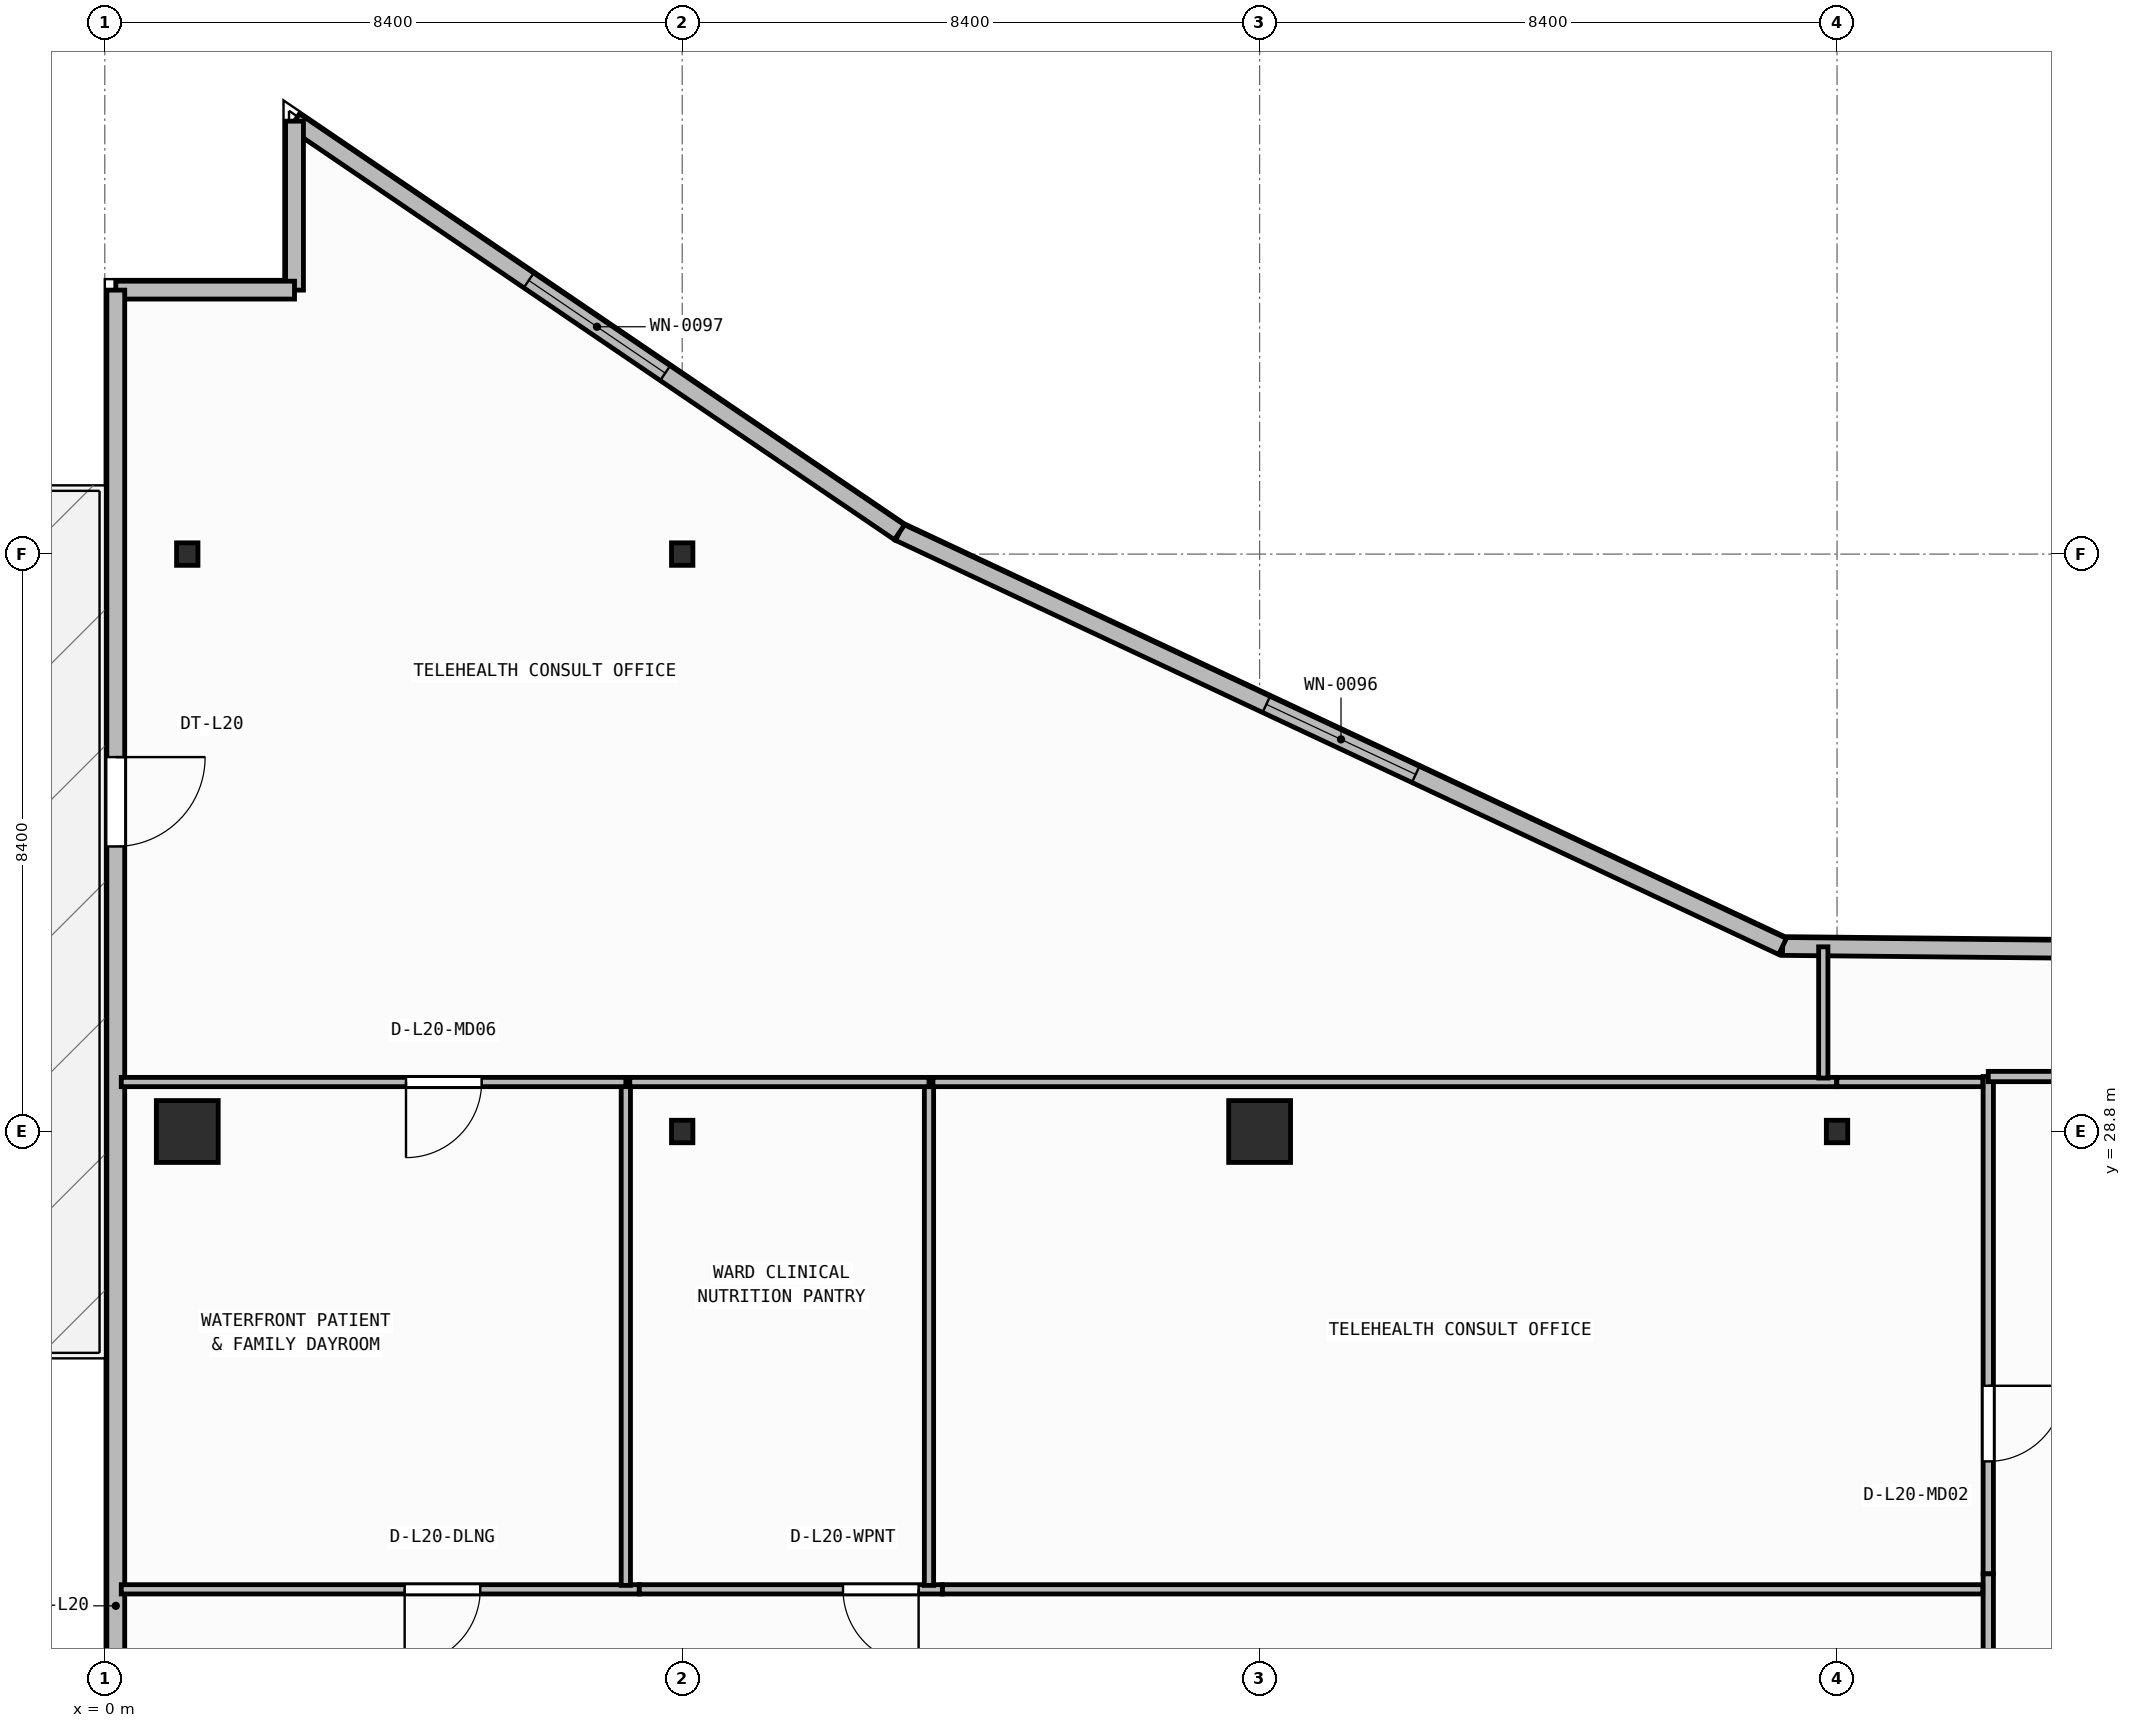
"""IFC4 building model, lengths in metres.
Left out: names, types, materials, properties, quantities, classifications, styles, units other than length and angle.
Written with IfcOpenShell. Run it as: python <this file> out.ifc"""

import sys

from ifc_helpers import new_model, si_unit, direction, frame, frame_2d, origin, origin_2d, place, context, subcontext, project, spatial, rectangle, i_section, extrude, element, fill, save


model = new_model("IFC4")
c1 = context("Model", 3, precision=1e-05, world=origin(), true_north=direction((0.0, 1.0)))
c2 = subcontext(c1, "Body", "Model", "MODEL_VIEW")
j1 = project(units=[si_unit("LENGTHUNIT", "METRE"), si_unit("PLANEANGLEUNIT", "RADIAN")], contexts=[c1])
p1 = place(None, origin())
s1 = spatial("IfcSite", under=j1, at=p1, CompositionType="ELEMENT")
p2 = place(p1, origin())
s2 = spatial("IfcBuilding", under=s1, at=p2, CompositionType="ELEMENT")
p3 = place(p2, frame((0.0, 0.0, 81.75)))
s3 = spatial("IfcBuildingStorey", under=s2, at=p3, CompositionType="ELEMENT", Elevation=81.75)
p4 = place(p3, frame((1.2, 28.8, 0.0), z_axis=(0.0, 0.0, 1.0), x_axis=(1.0, 0.0, 0.0)))
e1 = element("IfcColumn", 1, at=p4, inside=s3, PredefinedType="COLUMN", context=c2, shape_type="SweptSolid", body=[
    extrude(rectangle(XDim=0.9, YDim=0.9, at=origin_2d()), origin(), (0.0, 0.0, 1.0), 3.95),
])
p5 = place(p3, frame((8.4, 28.8, 0.0), z_axis=(0.0, 0.0, 1.0), x_axis=(1.0, 0.0, 0.0)))
e2 = element("IfcColumn", 2, at=p5, inside=s3, PredefinedType="COLUMN", context=c2, shape_type="SweptSolid", body=[
    extrude(i_section(OverallWidth=0.311, OverallDepth=0.327, WebThickness=0.016, FlangeThickness=0.025, FilletRadius=0.017, at=origin_2d()), origin(), (0.0, 0.0, 1.0), 3.95),
])
p6 = place(p3, frame((16.8, 28.8, 0.0), z_axis=(0.0, 0.0, 1.0), x_axis=(1.0, 0.0, 0.0)))
e3 = element("IfcColumn", 3, at=p6, inside=s3, PredefinedType="COLUMN", context=c2, shape_type="SweptSolid", body=[
    extrude(rectangle(XDim=0.9, YDim=0.9, at=origin_2d()), origin(), (0.0, 0.0, 1.0), 3.95),
])
for number, where, z_axis, x_axis in (
    (4, (25.2, 28.8, 0.0), (0.0, 0.0, 1.0), (1.0, 0.0, 0.0)),
    (5, (1.2, 37.2, 0.0), (0.0, 0.0, 1.0), (1.0, 0.0, 0.0)),
    (6, (8.4, 37.2, 0.0), (0.0, 0.0, 1.0), (1.0, 0.0, 0.0)),
):
    element("IfcColumn", number, at=place(p3, frame(where, z_axis=z_axis, x_axis=x_axis)), inside=s3, PredefinedType="COLUMN", context=c2, shape_type="SweptSolid", body=[
        extrude(i_section(OverallWidth=0.311, OverallDepth=0.327, WebThickness=0.016, FlangeThickness=0.025, FilletRadius=0.017, at=origin_2d()), origin(), (0.0, 0.0, 1.0), 3.95),
    ])
p7 = place(p3, frame((39.59, 31.344, 0.0), z_axis=(0.0, 0.0, 1.0), x_axis=(-0.999952362926, 0.009760731435, 0.0)))
e7 = element("IfcWall", 7, at=p7, inside=s3, PredefinedType="STANDARD", context=c2, shape_type="SweptSolid", body=[
    extrude(rectangle(XDim=15.183, YDim=0.26, at=frame_2d((7.591, 0.0))), origin(), (0.0, 0.0, 1.0), 3.71),
])
p8 = place(p7, frame((6.391, 0.0, 0.9)))
e8 = element("IfcOpeningElement", 8, at=p8, cuts=e7, PredefinedType="OPENING", context=c2, shape_type="SweptSolid", body=[
    extrude(rectangle(XDim=2.4, YDim=1.65, at=frame_2d((1.2, 0.825))), frame((0.0, 0.14, 0.0), z_axis=(0.0, -1.0, 0.0), x_axis=(1.0, 0.0, 0.0)), (0.0, 0.0, 1.0), 0.28),
])
p9 = place(p3, frame((24.408, 31.492, 0.0), z_axis=(0.0, 0.0, 1.0), x_axis=(-0.905396522918, 0.424566998585, 0.0)))
e9 = element("IfcWall", 9, at=p9, inside=s3, PredefinedType="STANDARD", context=c2, shape_type="SweptSolid", body=[
    extrude(rectangle(XDim=14.189, YDim=0.26, at=frame_2d((7.095, 0.0))), origin(), (0.0, 0.0, 1.0), 3.71),
])
p10 = place(p9, frame((5.895, 0.0, 0.9)))
e10 = element("IfcOpeningElement", 10, at=p10, cuts=e9, PredefinedType="OPENING", context=c2, shape_type="SweptSolid", body=[
    extrude(rectangle(XDim=2.4, YDim=1.65, at=frame_2d((1.2, 0.825))), frame((0.0, 0.14, 0.0), z_axis=(0.0, -1.0, 0.0), x_axis=(1.0, 0.0, 0.0)), (0.0, 0.0, 1.0), 0.28),
])
p11 = place(p3, frame((11.561, 37.517, 0.0), z_axis=(0.0, 0.0, 1.0), x_axis=(-0.827064743936, 0.562106670782, 0.0)))
e11 = element("IfcWall", 11, at=p11, inside=s3, PredefinedType="STANDARD", context=c2, shape_type="SweptSolid", body=[
    extrude(rectangle(XDim=10.641, YDim=0.26, at=frame_2d((5.32, 0.0))), origin(), (0.0, 0.0, 1.0), 3.71),
])
p12 = place(p11, frame((4.12, 0.0, 0.9)))
e12 = element("IfcOpeningElement", 12, at=p12, cuts=e11, PredefinedType="OPENING", context=c2, shape_type="SweptSolid", body=[
    extrude(rectangle(XDim=2.4, YDim=1.65, at=frame_2d((1.2, 0.825))), frame((0.0, 0.14, 0.0), z_axis=(0.0, -1.0, 0.0), x_axis=(1.0, 0.0, 0.0)), (0.0, 0.0, 1.0), 0.28),
])
p13 = place(p3, frame((2.76, 43.498, 0.0), z_axis=(0.0, 0.0, 1.0), x_axis=(0.0, -1.0, 0.0)))
e13 = element("IfcWall", 13, at=p13, inside=s3, PredefinedType="STANDARD", context=c2, shape_type="SweptSolid", body=[
    extrude(rectangle(XDim=2.458, YDim=0.26, at=frame_2d((1.229, 0.0))), origin(), (0.0, 0.0, 1.0), 3.71),
])
p14 = place(p3, frame((2.76, 41.04, 0.0), z_axis=(0.0, 0.0, 1.0), x_axis=(-1.0, 0.0, 0.0)))
e14 = element("IfcWall", 14, at=p14, inside=s3, PredefinedType="STANDARD", context=c2, shape_type="SweptSolid", body=[
    extrude(rectangle(XDim=2.6, YDim=0.26, at=frame_2d((1.3, 0.0))), origin(), (0.0, 0.0, 1.0), 3.71),
])
p15 = place(p3, frame((0.16, 41.04, 0.0), z_axis=(0.0, 0.0, 1.0), x_axis=(0.0, -1.0, 0.0)))
e15 = element("IfcWall", 15, at=p15, inside=s3, PredefinedType="STANDARD", context=c2, shape_type="SweptSolid", body=[
    extrude(rectangle(XDim=38.28, YDim=0.26, at=frame_2d((19.14, 0.0))), origin(), (0.0, 0.0, 1.0), 3.71),
])
p16 = place(p15, frame((6.793, 0.0, 0.0)))
e16 = element("IfcOpeningElement", 16, at=p16, cuts=e15, PredefinedType="OPENING", context=c2, shape_type="SweptSolid", body=[
    extrude(rectangle(XDim=1.3, YDim=2.15, at=frame_2d((0.65, 1.075))), frame((0.0, 0.14, 0.0), z_axis=(0.0, -1.0, 0.0), x_axis=(1.0, 0.0, 0.0)), (0.0, 0.0, 1.0), 0.28),
])
p17 = place(p3, frame((27.4, 22.366, 0.0), z_axis=(0.0, 0.0, 1.0), x_axis=(0.0, -1.0, 0.0)))
e17 = element("IfcWall", 17, at=p17, inside=s3, PredefinedType="PARTITIONING", context=c2, shape_type="SweptSolid", body=[
    extrude(rectangle(XDim=7.666, YDim=0.15, at=frame_2d((3.833, 0.0))), origin(), (0.0, 0.0, 1.0), 3.71),
])
p18 = place(p3, frame((27.4, 29.6, 0.0), z_axis=(0.0, 0.0, 1.0), x_axis=(0.0, -1.0, 0.0)))
e18 = element("IfcWall", 18, at=p18, inside=s3, PredefinedType="PARTITIONING", context=c2, shape_type="SweptSolid", body=[
    extrude(rectangle(XDim=7.232, YDim=0.15, at=frame_2d((3.616, 0.0))), origin(), (0.0, 0.0, 1.0), 3.71),
])
p19 = place(p18, frame((4.499, 0.0, 0.0)))
e19 = element("IfcOpeningElement", 19, at=p19, cuts=e18, PredefinedType="OPENING", context=c2, shape_type="SweptSolid", body=[
    extrude(rectangle(XDim=1.1, YDim=2.1, at=frame_2d((0.55, 1.05))), frame((0.0, 0.085, 0.0), z_axis=(0.0, -1.0, 0.0), x_axis=(1.0, 0.0, 0.0)), (0.0, 0.0, 1.0), 0.17),
])
p20 = place(p3, frame((29.9, 29.6, 0.0), z_axis=(0.0, 0.0, 1.0), x_axis=(-1.0, 0.0, 0.0)))
e20 = element("IfcWall", 20, at=p20, inside=s3, PredefinedType="PARTITIONING", context=c2, shape_type="SweptSolid", body=[
    extrude(rectangle(XDim=2.5, YDim=0.15, at=frame_2d((1.25, 0.0))), origin(), (0.0, 0.0, 1.0), 3.71),
])
p21 = place(p20, frame((0.225, 0.0, 0.0)))
e21 = element("IfcOpeningElement", 21, at=p21, cuts=e20, PredefinedType="OPENING", context=c2, shape_type="SweptSolid", body=[
    extrude(rectangle(XDim=1.1, YDim=2.1, at=frame_2d((0.55, 1.05))), frame((0.0, 0.085, 0.0), z_axis=(0.0, -1.0, 0.0), x_axis=(1.0, 0.0, 0.0)), (0.0, 0.0, 1.0), 0.17),
])
p22 = place(p3, frame((7.775, 22.14, 0.0), z_axis=(0.0, 0.0, 1.0), x_axis=(-1.0, 0.0, 0.0)))
e22 = element("IfcWall", 22, at=p22, inside=s3, PredefinedType="PARTITIONING", context=c2, shape_type="SweptSolid", body=[
    extrude(rectangle(XDim=7.535, YDim=0.135, at=frame_2d((3.767, 0.0))), origin(), (0.0, 0.0, 1.0), 3.71),
])
p23 = place(p22, frame((2.312, 0.0, 0.0)))
e23 = element("IfcOpeningElement", 23, at=p23, cuts=e22, PredefinedType="OPENING", context=c2, shape_type="SweptSolid", body=[
    extrude(rectangle(XDim=1.1, YDim=2.1, at=frame_2d((0.55, 1.05))), frame((0.0, 0.077, 0.0), z_axis=(0.0, -1.0, 0.0), x_axis=(1.0, 0.0, 0.0)), (0.0, 0.0, 1.0), 0.155),
])
p24 = place(p3, frame((12.185, 22.14, 0.0), z_axis=(0.0, 0.0, 1.0), x_axis=(-1.0, 0.0, 0.0)))
e24 = element("IfcWall", 24, at=p24, inside=s3, PredefinedType="PARTITIONING", context=c2, shape_type="SweptSolid", body=[
    extrude(rectangle(XDim=4.408, YDim=0.135, at=frame_2d((2.204, 0.0))), origin(), (0.0, 0.0, 1.0), 3.71),
])
p25 = place(p24, frame((0.345, 0.0, 0.0)))
e25 = element("IfcOpeningElement", 25, at=p25, cuts=e24, PredefinedType="OPENING", context=c2, shape_type="SweptSolid", body=[
    extrude(rectangle(XDim=1.1, YDim=2.1, at=frame_2d((0.55, 1.05))), frame((0.0, 0.077, 0.0), z_axis=(0.0, -1.0, 0.0), x_axis=(1.0, 0.0, 0.0)), (0.0, 0.0, 1.0), 0.155),
])
p26 = place(p3, frame((27.32, 22.14, 0.0), z_axis=(0.0, 0.0, 1.0), x_axis=(-1.0, 0.0, 0.0)))
e26 = element("IfcWall", 26, at=p26, inside=s3, PredefinedType="PARTITIONING", context=c2, shape_type="SweptSolid", body=[
    extrude(rectangle(XDim=15.134, YDim=0.135, at=frame_2d((7.567, 0.0))), origin(), (0.0, 0.0, 1.0), 3.71),
])
p27 = place(p3, frame((7.58, 22.198, 0.0), z_axis=(0.0, 0.0, 1.0), x_axis=(0.0, 1.0, 0.0)))
e27 = element("IfcWall", 27, at=p27, inside=s3, PredefinedType="PARTITIONING", context=c2, shape_type="SweptSolid", body=[
    extrude(rectangle(XDim=7.323, YDim=0.135, at=frame_2d((3.661, 0.0))), origin(), (0.0, 0.0, 1.0), 3.71),
])
p28 = place(p3, frame((7.58, 29.52, 0.0), z_axis=(0.0, 0.0, 1.0), x_axis=(-1.0, 0.0, 0.0)))
e28 = element("IfcWall", 28, at=p28, inside=s3, PredefinedType="PARTITIONING", context=c2, shape_type="SweptSolid", body=[
    extrude(rectangle(XDim=7.34, YDim=0.135, at=frame_2d((3.67, 0.0))), origin(), (0.0, 0.0, 1.0), 3.71),
])
p29 = place(p28, frame((2.098, 0.0, 0.0)))
e29 = element("IfcOpeningElement", 29, at=p29, cuts=e28, PredefinedType="OPENING", context=c2, shape_type="SweptSolid", body=[
    extrude(rectangle(XDim=1.1, YDim=2.1, at=frame_2d((0.55, 1.05))), frame((0.0, 0.077, 0.0), z_axis=(0.0, -1.0, 0.0), x_axis=(1.0, 0.0, 0.0)), (0.0, 0.0, 1.0), 0.155),
])
p30 = place(p3, frame((11.99, 22.198, 0.0), z_axis=(0.0, 0.0, 1.0), x_axis=(0.0, 1.0, 0.0)))
e30 = element("IfcWall", 30, at=p30, inside=s3, PredefinedType="PARTITIONING", context=c2, shape_type="SweptSolid", body=[
    extrude(rectangle(XDim=7.323, YDim=0.135, at=frame_2d((3.661, 0.0))), origin(), (0.0, 0.0, 1.0), 3.71),
])
p31 = place(p3, frame((11.99, 29.52, 0.0), z_axis=(0.0, 0.0, 1.0), x_axis=(-1.0, 0.0, 0.0)))
e31 = element("IfcWall", 31, at=p31, inside=s3, PredefinedType="PARTITIONING", context=c2, shape_type="SweptSolid", body=[
    extrude(rectangle(XDim=4.353, YDim=0.135, at=frame_2d((2.176, 0.0))), origin(), (0.0, 0.0, 1.0), 3.71),
])
p32 = place(p3, frame((25.195, 29.52, 0.0), z_axis=(0.0, 0.0, 1.0), x_axis=(-1.0, 0.0, 0.0)))
e32 = element("IfcWall", 32, at=p32, inside=s3, PredefinedType="PARTITIONING", context=c2, shape_type="SweptSolid", body=[
    extrude(rectangle(XDim=13.147, YDim=0.135, at=frame_2d((6.573, 0.0))), origin(), (0.0, 0.0, 1.0), 3.71),
])
p33 = place(p3, frame((27.32, 29.52, 0.0), z_axis=(0.0, 0.0, 1.0), x_axis=(-1.0, 0.0, 0.0)))
e33 = element("IfcWall", 33, at=p33, inside=s3, PredefinedType="PARTITIONING", context=c2, shape_type="SweptSolid", body=[
    extrude(rectangle(XDim=2.124, YDim=0.135, at=frame_2d((1.062, 0.0))), origin(), (0.0, 0.0, 1.0), 3.71),
])
p34 = place(p3, frame((25.0, 29.577, 0.0), z_axis=(0.0, 0.0, 1.0), x_axis=(0.0, 1.0, 0.0)))
e34 = element("IfcWall", 34, at=p34, inside=s3, PredefinedType="PARTITIONING", context=c2, shape_type="SweptSolid", body=[
    extrude(rectangle(XDim=1.909, YDim=0.135, at=frame_2d((0.955, 0.0))), origin(), (0.0, 0.0, 1.0), 3.71),
])
p35 = place(p10, origin())
e35 = element("IfcWindow", 35, at=p35, inside=s3, PartitioningType="SINGLE_PANEL", PredefinedType="WINDOW", context=c2, shape_type="SweptSolid", body=[
    extrude(rectangle(XDim=2.4, YDim=1.65, at=frame_2d((1.2, 0.825))), frame((0.0, 0.03, 0.0), z_axis=(0.0, -1.0, 0.0), x_axis=(1.0, 0.0, 0.0)), (0.0, 0.0, 1.0), 0.06),
])
fill(e10, e35)
p36 = place(p12, origin())
e36 = element("IfcWindow", 36, at=p36, inside=s3, PartitioningType="SINGLE_PANEL", PredefinedType="WINDOW", context=c2, shape_type="SweptSolid", body=[
    extrude(rectangle(XDim=2.4, YDim=1.65, at=frame_2d((1.2, 0.825))), frame((0.0, 0.03, 0.0), z_axis=(0.0, -1.0, 0.0), x_axis=(1.0, 0.0, 0.0)), (0.0, 0.0, 1.0), 0.06),
])
fill(e12, e36)
p37 = place(p16, origin())
e37 = element("IfcDoor", 37, at=p37, inside=s3, OperationType="SINGLE_SWING_LEFT", PredefinedType="DOOR", context=c2, shape_type="SweptSolid", body=[
    extrude(rectangle(XDim=1.3, YDim=2.15, at=frame_2d((0.65, 1.075))), frame((0.0, 0.025, 0.0), z_axis=(0.0, -1.0, 0.0), x_axis=(1.0, 0.0, 0.0)), (0.0, 0.0, 1.0), 0.05),
])
fill(e16, e37)
p38 = place(p19, origin())
e38 = element("IfcDoor", 38, at=p38, inside=s3, OperationType="SINGLE_SWING_LEFT", PredefinedType="DOOR", context=c2, shape_type="SweptSolid", body=[
    extrude(rectangle(XDim=1.1, YDim=2.1, at=frame_2d((0.55, 1.05))), frame((0.0, 0.025, 0.0), z_axis=(0.0, -1.0, 0.0), x_axis=(1.0, 0.0, 0.0)), (0.0, 0.0, 1.0), 0.05),
])
fill(e19, e38)
p39 = place(p23, origin())
e39 = element("IfcDoor", 39, at=p39, inside=s3, OperationType="SINGLE_SWING_RIGHT", PredefinedType="DOOR", context=c2, shape_type="SweptSolid", body=[
    extrude(rectangle(XDim=1.1, YDim=2.1, at=frame_2d((0.55, 1.05))), frame((0.0, 0.025, 0.0), z_axis=(0.0, -1.0, 0.0), x_axis=(1.0, 0.0, 0.0)), (0.0, 0.0, 1.0), 0.05),
])
fill(e23, e39)
p40 = place(p25, origin())
e40 = element("IfcDoor", 40, at=p40, inside=s3, OperationType="SINGLE_SWING_LEFT", PredefinedType="DOOR", context=c2, shape_type="SweptSolid", body=[
    extrude(rectangle(XDim=1.1, YDim=2.1, at=frame_2d((0.55, 1.05))), frame((0.0, 0.025, 0.0), z_axis=(0.0, -1.0, 0.0), x_axis=(1.0, 0.0, 0.0)), (0.0, 0.0, 1.0), 0.05),
])
fill(e25, e40)
p41 = place(p29, origin())
e41 = element("IfcDoor", 41, at=p41, inside=s3, OperationType="SINGLE_SWING_RIGHT", PredefinedType="DOOR", context=c2, shape_type="SweptSolid", body=[
    extrude(rectangle(XDim=1.1, YDim=2.1, at=frame_2d((0.55, 1.05))), frame((0.0, 0.025, 0.0), z_axis=(0.0, -1.0, 0.0), x_axis=(1.0, 0.0, 0.0)), (0.0, 0.0, 1.0), 0.05),
])
fill(e29, e41)
save(model, sys.argv[1])
